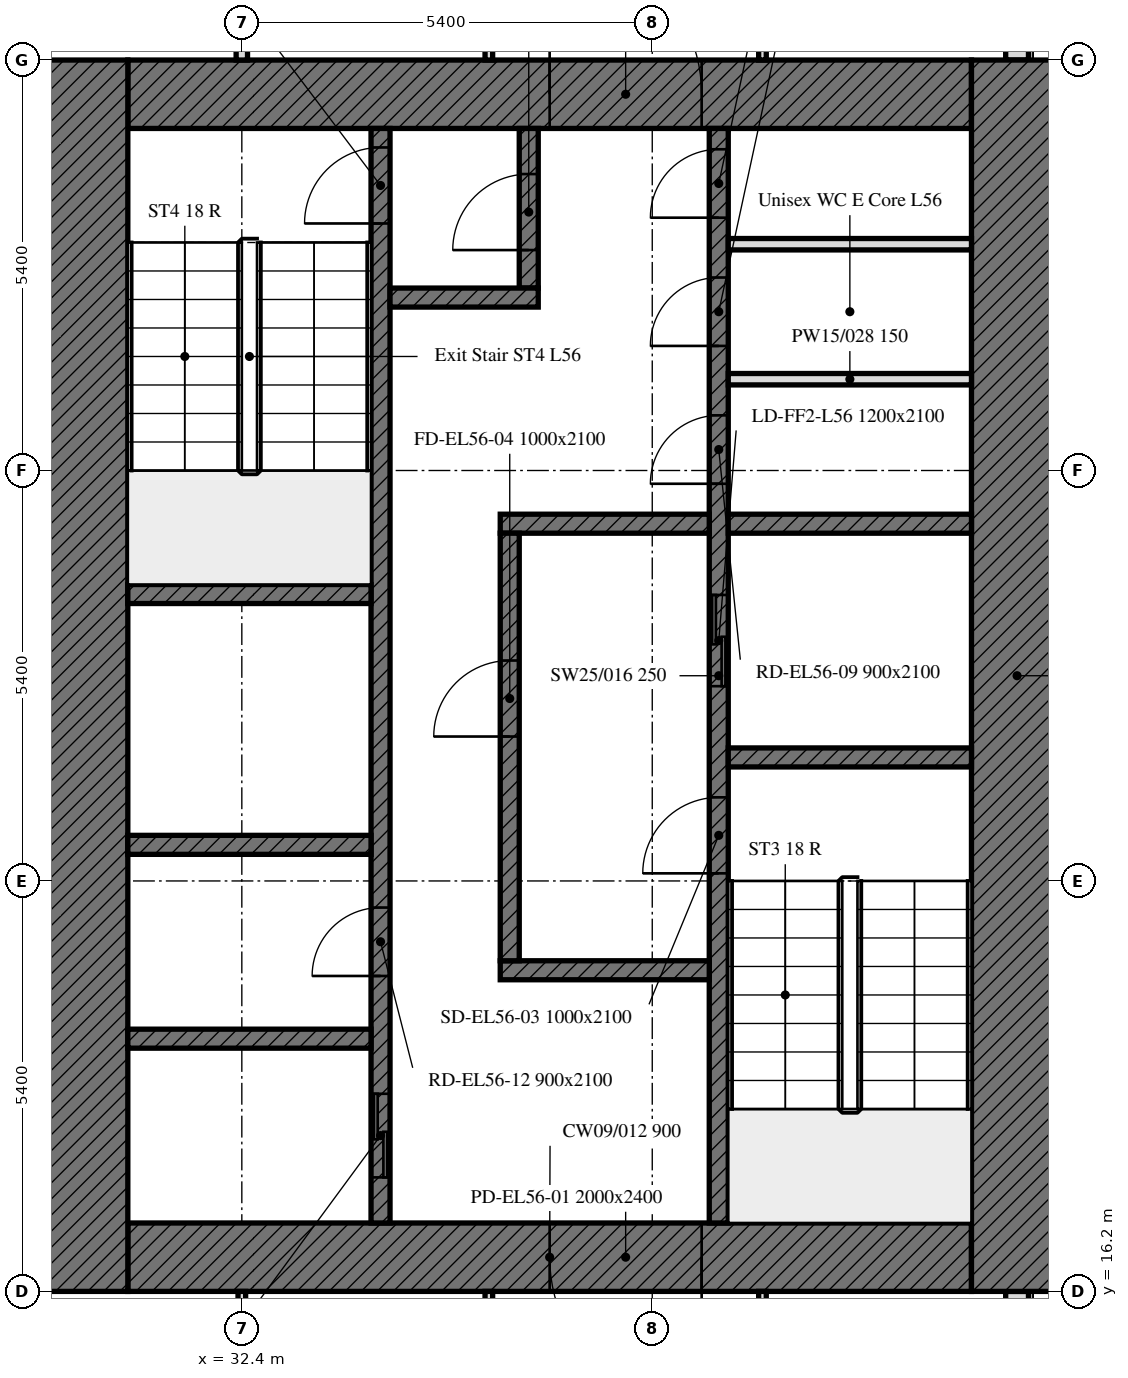
"""IFC4 building model, lengths in metres.
Left out: names, types, materials, properties, quantities, classifications, styles, units other than length and angle.
Written with IfcOpenShell. Run it as: python <this file> out.ifc"""

import sys

from ifc_helpers import new_model, si_unit, direction, frame, frame_2d, origin, place, context, subcontext, project, spatial, rectangle, extrude, element, fill, save


model = new_model("IFC4")
c1 = context("Model", 3, precision=1e-05, world=origin(), true_north=direction((0.0, 1.0)))
c2 = subcontext(c1, "Body", "Model", "MODEL_VIEW")
j1 = project(units=[si_unit("LENGTHUNIT", "METRE"), si_unit("PLANEANGLEUNIT", "RADIAN")], contexts=[c1])
p1 = place(None, origin())
s1 = spatial("IfcSite", under=j1, at=p1, CompositionType="ELEMENT")
p2 = place(p1, origin())
s2 = spatial("IfcBuilding", under=s1, at=p2, CompositionType="ELEMENT")
p3 = place(p2, frame((0.0, 0.0, 223.6)))
s3 = spatial("IfcBuildingStorey", under=s2, at=p3, CompositionType="ELEMENT", Elevation=223.6)
p4 = place(p3, frame((42.6, 10.986, 0.0), z_axis=(0.0, 0.0, 1.0), x_axis=(0.0, 1.0, 0.0)))
e1 = element("IfcWall", 1, at=p4, inside=s3, PredefinedType="SOLIDWALL", context=c2, shape_type="SweptSolid", body=[
    extrude(rectangle(XDim=5.214, YDim=0.3, at=frame_2d((2.607, 0.0))), origin(), (0.0, 0.0, 1.0), 3.0),
])
p5 = place(p4, frame((1.239, 0.0, 0.9)))
e2 = element("IfcOpeningElement", 2, at=p5, cuts=e1, PredefinedType="OPENING", context=c2, shape_type="SweptSolid", body=[
    extrude(rectangle(XDim=0.65, YDim=1.7, at=frame_2d((0.325, 0.85))), frame((0.0, 0.16, 0.0), z_axis=(0.0, -1.0, 0.0), x_axis=(1.0, 0.0, 0.0)), (0.0, 0.0, 1.0), 0.32),
])
p6 = place(p4, frame((2.764, 0.0, 0.9)))
e3 = element("IfcOpeningElement", 3, at=p6, cuts=e1, PredefinedType="OPENING", context=c2, shape_type="SweptSolid", body=[
    extrude(rectangle(XDim=1.1, YDim=1.7, at=frame_2d((0.55, 0.85))), frame((0.0, 0.16, 0.0), z_axis=(0.0, -1.0, 0.0), x_axis=(1.0, 0.0, 0.0)), (0.0, 0.0, 1.0), 0.32),
])
p7 = place(p3, frame((42.6, 32.4, 0.0), z_axis=(0.0, 0.0, 1.0), x_axis=(0.0, 1.0, 0.0)))
e4 = element("IfcWall", 4, at=p7, inside=s3, PredefinedType="SOLIDWALL", context=c2, shape_type="SweptSolid", body=[
    extrude(rectangle(XDim=10.614, YDim=0.3, at=frame_2d((5.307, 0.0))), origin(), (0.0, 0.0, 1.0), 3.0),
])
p8 = place(p7, frame((1.35, 0.0, 0.9)))
e5 = element("IfcOpeningElement", 5, at=p8, cuts=e4, PredefinedType="OPENING", context=c2, shape_type="SweptSolid", body=[
    extrude(rectangle(XDim=1.1, YDim=1.7, at=frame_2d((0.55, 0.85))), frame((0.0, 0.16, 0.0), z_axis=(0.0, -1.0, 0.0), x_axis=(1.0, 0.0, 0.0)), (0.0, 0.0, 1.0), 0.32),
])
p9 = place(p7, frame((2.95, 0.0, 0.9)))
e6 = element("IfcOpeningElement", 6, at=p9, cuts=e4, PredefinedType="OPENING", context=c2, shape_type="SweptSolid", body=[
    extrude(rectangle(XDim=1.1, YDim=1.7, at=frame_2d((0.55, 0.85))), frame((0.0, 0.16, 0.0), z_axis=(0.0, -1.0, 0.0), x_axis=(1.0, 0.0, 0.0)), (0.0, 0.0, 1.0), 0.32),
])
p10 = place(p7, frame((7.375, 0.0, 0.9)))
e7 = element("IfcOpeningElement", 7, at=p10, cuts=e4, PredefinedType="OPENING", context=c2, shape_type="SweptSolid", body=[
    extrude(rectangle(XDim=0.65, YDim=1.7, at=frame_2d((0.325, 0.85))), frame((0.0, 0.16, 0.0), z_axis=(0.0, -1.0, 0.0), x_axis=(1.0, 0.0, 0.0)), (0.0, 0.0, 1.0), 0.32),
])
p11 = place(p7, frame((8.175, 0.0, 0.9)))
e8 = element("IfcOpeningElement", 8, at=p11, cuts=e4, PredefinedType="OPENING", context=c2, shape_type="SweptSolid", body=[
    extrude(rectangle(XDim=0.65, YDim=1.7, at=frame_2d((0.325, 0.85))), frame((0.0, 0.16, 0.0), z_axis=(0.0, -1.0, 0.0), x_axis=(1.0, 0.0, 0.0)), (0.0, 0.0, 1.0), 0.32),
])
p12 = place(p3, frame((42.0, 16.65, 0.0), z_axis=(0.0, 0.0, 1.0), x_axis=(-1.0, 0.0, 0.0)))
e9 = element("IfcWall", 9, at=p12, inside=s3, PredefinedType="SOLIDWALL", context=c2, shape_type="SweptSolid", body=[
    extrude(rectangle(XDim=11.1, YDim=0.9, at=frame_2d((5.55, 0.0))), origin(), (0.0, 0.0, 1.0), 3.0),
])
p13 = place(p12, frame((3.55, 0.0, 0.0)))
e10 = element("IfcOpeningElement", 10, at=p13, cuts=e9, PredefinedType="OPENING", context=c2, shape_type="SweptSolid", body=[
    extrude(rectangle(XDim=2.0, YDim=2.4, at=frame_2d((1.0, 1.2))), frame((0.0, 0.45, 0.0), z_axis=(0.0, -1.0, 0.0), x_axis=(1.0, 0.0, 0.0)), (0.0, 0.0, 1.0), 0.9),
])
p14 = place(p3, frame((30.9, 31.95, 0.0), z_axis=(0.0, 0.0, 1.0), x_axis=(1.0, 0.0, 0.0)))
e11 = element("IfcWall", 11, at=p14, inside=s3, PredefinedType="SOLIDWALL", context=c2, shape_type="SweptSolid", body=[
    extrude(rectangle(XDim=11.1, YDim=0.9, at=frame_2d((5.55, 0.0))), origin(), (0.0, 0.0, 1.0), 3.0),
])
p15 = place(p14, frame((5.55, 0.0, 0.0)))
e12 = element("IfcOpeningElement", 12, at=p15, cuts=e11, PredefinedType="OPENING", context=c2, shape_type="SweptSolid", body=[
    extrude(rectangle(XDim=2.0, YDim=2.4, at=frame_2d((1.0, 1.2))), frame((0.0, 0.45, 0.0), z_axis=(0.0, -1.0, 0.0), x_axis=(1.0, 0.0, 0.0)), (0.0, 0.0, 1.0), 0.9),
])
for number, where, z_axis, x_axis in (
    (13, (42.6, 32.4, 0.0), (0.0, 0.0, 1.0), (0.0, -1.0, 0.0)),
    (14, (30.3, 16.2, 0.0), (0.0, 0.0, 1.0), (0.0, 1.0, 0.0)),
):
    element("IfcWall", number, at=place(p3, frame(where, z_axis=z_axis, x_axis=x_axis)), inside=s3, PredefinedType="SOLIDWALL", context=c2, shape_type="SweptSolid", body=[
        extrude(rectangle(XDim=16.2, YDim=1.2, at=frame_2d((8.1, 0.0))), origin(), (0.0, 0.0, 1.0), 3.0),
    ])
p16 = place(p3, frame((38.675, 17.1, 0.0), z_axis=(0.0, 0.0, 1.0), x_axis=(0.0, 1.0, 0.0)))
e15 = element("IfcWall", 15, at=p16, inside=s3, PredefinedType="SOLIDWALL", context=c2, shape_type="SweptSolid", body=[
    extrude(rectangle(XDim=14.4, YDim=0.25, at=frame_2d((7.2, 0.0))), origin(), (0.0, 0.0, 1.0), 3.0),
])
p17 = place(p16, frame((4.6, 0.0, 0.0)))
e16 = element("IfcOpeningElement", 16, at=p17, cuts=e15, PredefinedType="OPENING", context=c2, shape_type="SweptSolid", body=[
    extrude(rectangle(XDim=1.0, YDim=2.1, at=frame_2d((0.5, 1.05))), frame((0.0, 0.125, 0.0), z_axis=(0.0, -1.0, 0.0), x_axis=(1.0, 0.0, 0.0)), (0.0, 0.0, 1.0), 0.25),
])
p18 = place(p16, frame((7.062, 0.0, 0.0)))
e17 = element("IfcOpeningElement", 17, at=p18, cuts=e15, PredefinedType="OPENING", context=c2, shape_type="SweptSolid", body=[
    extrude(rectangle(XDim=1.2, YDim=2.1, at=frame_2d((0.6, 1.05))), frame((0.0, 0.125, 0.0), z_axis=(0.0, -1.0, 0.0), x_axis=(1.0, 0.0, 0.0)), (0.0, 0.0, 1.0), 0.25),
])
p19 = place(p16, frame((9.726, 0.0, 0.0)))
e18 = element("IfcOpeningElement", 18, at=p19, cuts=e15, PredefinedType="OPENING", context=c2, shape_type="SweptSolid", body=[
    extrude(rectangle(XDim=0.9, YDim=2.1, at=frame_2d((0.45, 1.05))), frame((0.0, 0.125, 0.0), z_axis=(0.0, -1.0, 0.0), x_axis=(1.0, 0.0, 0.0)), (0.0, 0.0, 1.0), 0.25),
])
p20 = place(p16, frame((11.539, 0.0, 0.0)))
e19 = element("IfcOpeningElement", 19, at=p20, cuts=e15, PredefinedType="OPENING", context=c2, shape_type="SweptSolid", body=[
    extrude(rectangle(XDim=0.9, YDim=2.1, at=frame_2d((0.45, 1.05))), frame((0.0, 0.125, 0.0), z_axis=(0.0, -1.0, 0.0), x_axis=(1.0, 0.0, 0.0)), (0.0, 0.0, 1.0), 0.25),
])
p21 = place(p16, frame((13.226, 0.0, 0.0)))
e20 = element("IfcOpeningElement", 20, at=p21, cuts=e15, PredefinedType="OPENING", context=c2, shape_type="SweptSolid", body=[
    extrude(rectangle(XDim=0.9, YDim=2.1, at=frame_2d((0.45, 1.05))), frame((0.0, 0.125, 0.0), z_axis=(0.0, -1.0, 0.0), x_axis=(1.0, 0.0, 0.0)), (0.0, 0.0, 1.0), 0.25),
])
p22 = place(p3, frame((34.225, 17.1, 0.0), z_axis=(0.0, 0.0, 1.0), x_axis=(0.0, 1.0, 0.0)))
e21 = element("IfcWall", 21, at=p22, inside=s3, PredefinedType="SOLIDWALL", context=c2, shape_type="SweptSolid", body=[
    extrude(rectangle(XDim=14.4, YDim=0.25, at=frame_2d((7.2, 0.0))), origin(), (0.0, 0.0, 1.0), 3.0),
])
p23 = place(p22, frame((13.15, 0.0, 0.0)))
e22 = element("IfcOpeningElement", 22, at=p23, cuts=e21, PredefinedType="OPENING", context=c2, shape_type="SweptSolid", body=[
    extrude(rectangle(XDim=1.0, YDim=2.1, at=frame_2d((0.5, 1.05))), frame((0.0, 0.125, 0.0), z_axis=(0.0, -1.0, 0.0), x_axis=(1.0, 0.0, 0.0)), (0.0, 0.0, 1.0), 0.25),
])
p24 = place(p22, frame((0.6, 0.0, 0.0)))
e23 = element("IfcOpeningElement", 23, at=p24, cuts=e21, PredefinedType="OPENING", context=c2, shape_type="SweptSolid", body=[
    extrude(rectangle(XDim=1.1, YDim=2.1, at=frame_2d((0.55, 1.05))), frame((0.0, 0.125, 0.0), z_axis=(0.0, -1.0, 0.0), x_axis=(1.0, 0.0, 0.0)), (0.0, 0.0, 1.0), 0.25),
])
p25 = place(p22, frame((3.25, 0.0, 0.0)))
e24 = element("IfcOpeningElement", 24, at=p25, cuts=e21, PredefinedType="OPENING", context=c2, shape_type="SweptSolid", body=[
    extrude(rectangle(XDim=0.9, YDim=2.1, at=frame_2d((0.45, 1.05))), frame((0.0, 0.125, 0.0), z_axis=(0.0, -1.0, 0.0), x_axis=(1.0, 0.0, 0.0)), (0.0, 0.0, 1.0), 0.25),
])
p26 = place(p3, frame((38.8, 23.225, 0.0), z_axis=(0.0, 0.0, 1.0), x_axis=(1.0, 0.0, 0.0)))
e25 = element("IfcWall", 25, at=p26, inside=s3, PredefinedType="SOLIDWALL", context=c2, shape_type="SweptSolid", body=[
    extrude(rectangle(XDim=3.2, YDim=0.25, at=frame_2d((1.6, 0.0))), origin(), (0.0, 0.0, 1.0), 3.0),
])
for number, where, z_axis, x_axis in (
    (26, (30.9, 25.375, 0.0), (0.0, 0.0, 1.0), (1.0, 0.0, 0.0)),
    (27, (30.9, 22.075, 0.0), (0.0, 0.0, 1.0), (1.0, 0.0, 0.0)),
):
    element("IfcWall", number, at=place(p3, frame(where, z_axis=z_axis, x_axis=x_axis)), inside=s3, PredefinedType="SOLIDWALL", context=c2, shape_type="SweptSolid", body=[
        extrude(rectangle(XDim=3.2, YDim=0.25, at=frame_2d((1.6, 0.0))), origin(), (0.0, 0.0, 1.0), 3.0),
    ])
p27 = place(p3, frame((38.8, 26.3, 0.0), z_axis=(0.0, 0.0, 1.0), x_axis=(1.0, 0.0, 0.0)))
e28 = element("IfcWall", 28, at=p27, inside=s3, PredefinedType="SOLIDWALL", context=c2, shape_type="SweptSolid", body=[
    extrude(rectangle(XDim=3.2, YDim=0.25, at=frame_2d((1.6, 0.0))), origin(), (0.0, 0.0, 1.0), 3.0),
])
for number, where, z_axis, x_axis in (
    (29, (35.8, 26.3, 0.0), (0.0, 0.0, 1.0), (1.0, 0.0, 0.0)),
    (30, (35.8, 20.425, 0.0), (0.0, 0.0, 1.0), (1.0, 0.0, 0.0)),
):
    element("IfcWall", number, at=place(p3, frame(where, z_axis=z_axis, x_axis=x_axis)), inside=s3, PredefinedType="SOLIDWALL", context=c2, shape_type="SweptSolid", body=[
        extrude(rectangle(XDim=2.75, YDim=0.25, at=frame_2d((1.375, 0.0))), origin(), (0.0, 0.0, 1.0), 3.0),
    ])
p28 = place(p3, frame((36.175, 29.4, 0.0), z_axis=(0.0, 0.0, 1.0), x_axis=(0.0, 1.0, 0.0)))
e31 = element("IfcWall", 31, at=p28, inside=s3, PredefinedType="SOLIDWALL", context=c2, shape_type="SweptSolid", body=[
    extrude(rectangle(XDim=2.1, YDim=0.25, at=frame_2d((1.05, 0.0))), origin(), (0.0, 0.0, 1.0), 3.0),
])
p29 = place(p28, frame((0.5, 0.0, 0.0)))
e32 = element("IfcOpeningElement", 32, at=p29, cuts=e31, PredefinedType="OPENING", context=c2, shape_type="SweptSolid", body=[
    extrude(rectangle(XDim=1.0, YDim=2.1, at=frame_2d((0.5, 1.05))), frame((0.0, 0.125, 0.0), z_axis=(0.0, -1.0, 0.0), x_axis=(1.0, 0.0, 0.0)), (0.0, 0.0, 1.0), 0.25),
])
p30 = place(p3, frame((34.35, 29.275, 0.0), z_axis=(0.0, 0.0, 1.0), x_axis=(1.0, 0.0, 0.0)))
e33 = element("IfcWall", 33, at=p30, inside=s3, PredefinedType="SOLIDWALL", context=c2, shape_type="SweptSolid", body=[
    extrude(rectangle(XDim=1.95, YDim=0.25, at=frame_2d((0.975, 0.0))), origin(), (0.0, 0.0, 1.0), 3.0),
])
p31 = place(p3, frame((35.925, 20.55, 0.0), z_axis=(0.0, 0.0, 1.0), x_axis=(0.0, 1.0, 0.0)))
e34 = element("IfcWall", 34, at=p31, inside=s3, PredefinedType="SOLIDWALL", context=c2, shape_type="SweptSolid", body=[
    extrude(rectangle(XDim=5.625, YDim=0.25, at=frame_2d((2.812, 0.0))), origin(), (0.0, 0.0, 1.0), 3.0),
])
p32 = place(p31, frame((2.95, 0.0, 0.0)))
e35 = element("IfcOpeningElement", 35, at=p32, cuts=e34, PredefinedType="OPENING", context=c2, shape_type="SweptSolid", body=[
    extrude(rectangle(XDim=1.0, YDim=2.1, at=frame_2d((0.5, 1.05))), frame((0.0, 0.125, 0.0), z_axis=(0.0, -1.0, 0.0), x_axis=(1.0, 0.0, 0.0)), (0.0, 0.0, 1.0), 0.25),
])
p33 = place(p3, frame((30.9, 19.525, 0.0), z_axis=(0.0, 0.0, 1.0), x_axis=(1.0, 0.0, 0.0)))
e36 = element("IfcWall", 36, at=p33, inside=s3, PredefinedType="SOLIDWALL", context=c2, shape_type="SweptSolid", body=[
    extrude(rectangle(XDim=3.2, YDim=0.25, at=frame_2d((1.6, 0.0))), origin(), (0.0, 0.0, 1.0), 3.0),
])
for number, where, z_axis, x_axis in (
    (37, (38.8, 28.201, 0.0), (0.0, 0.0, 1.0), (1.0, 0.0, 0.0)),
    (38, (38.8, 29.977, 0.0), (0.0, 0.0, 1.0), (1.0, 0.0, 0.0)),
):
    element("IfcWall", number, at=place(p3, frame(where, z_axis=z_axis, x_axis=x_axis)), inside=s3, PredefinedType="PARTITIONING", context=c2, shape_type="SweptSolid", body=[
        extrude(rectangle(XDim=3.2, YDim=0.15, at=frame_2d((1.6, 0.0))), origin(), (0.0, 0.0, 1.0), 3.0),
    ])
p34 = place(p3, frame((32.4, 32.4, 0.0), z_axis=(0.0, 0.0, 1.0), x_axis=(0.0, 1.0, 0.0)))
e39 = element("IfcWall", 39, at=p34, inside=s3, PredefinedType="PARTITIONING", context=c2, shape_type="SweptSolid", body=[
    extrude(rectangle(XDim=5.005, YDim=0.15, at=frame_2d((2.502, 0.0))), origin(), (0.0, 0.0, 1.0), 2.4),
])
for number, where, z_axis, x_axis in (
    (40, (39.25, 32.4, 0.0), (0.0, 0.0, 1.0), (0.0, 1.0, 0.0)),
    (41, (35.65, 39.525, 0.0), (0.0, 0.0, 1.0), (0.0, -1.0, 0.0)),
):
    element("IfcWall", number, at=place(p3, frame(where, z_axis=z_axis, x_axis=x_axis)), inside=s3, PredefinedType="PARTITIONING", context=c2, shape_type="SweptSolid", body=[
        extrude(rectangle(XDim=7.125, YDim=0.1, at=frame_2d((3.562, 0.0))), origin(), (0.0, 0.0, 1.0), 3.0),
    ])
for number, where, z_axis, x_axis in (
    (42, (32.4, 13.125, 0.0), (0.0, 0.0, 1.0), (0.0, 1.0, 0.0)),
    (43, (39.25, 13.125, 0.0), (0.0, 0.0, 1.0), (0.0, 1.0, 0.0)),
    (44, (35.65, 16.2, 0.0), (0.0, 0.0, 1.0), (0.0, -1.0, 0.0)),
):
    element("IfcWall", number, at=place(p3, frame(where, z_axis=z_axis, x_axis=x_axis)), inside=s3, PredefinedType="PARTITIONING", context=c2, shape_type="SweptSolid", body=[
        extrude(rectangle(XDim=3.075, YDim=0.1, at=frame_2d((1.538, 0.0))), origin(), (0.0, 0.0, 1.0), 3.0),
    ])
p35 = place(p13, origin())
e45 = element("IfcDoor", 45, at=p35, inside=s3, OperationType="DOUBLE_DOOR_SINGLE_SWING", PredefinedType="DOOR", context=c2, shape_type="SweptSolid", body=[
    extrude(rectangle(XDim=2.0, YDim=2.4, at=frame_2d((1.0, 1.2))), frame((0.0, 0.025, 0.0), z_axis=(0.0, -1.0, 0.0), x_axis=(1.0, 0.0, 0.0)), (0.0, 0.0, 1.0), 0.05),
])
fill(e10, e45)
p36 = place(p15, origin())
e46 = element("IfcDoor", 46, at=p36, inside=s3, OperationType="DOUBLE_DOOR_SINGLE_SWING", PredefinedType="DOOR", context=c2, shape_type="SweptSolid", body=[
    extrude(rectangle(XDim=2.0, YDim=2.4, at=frame_2d((1.0, 1.2))), frame((0.0, 0.025, 0.0), z_axis=(0.0, -1.0, 0.0), x_axis=(1.0, 0.0, 0.0)), (0.0, 0.0, 1.0), 0.05),
])
fill(e12, e46)
p37 = place(p17, origin())
e47 = element("IfcDoor", 47, at=p37, inside=s3, OperationType="SINGLE_SWING_LEFT", PredefinedType="DOOR", context=c2, shape_type="SweptSolid", body=[
    extrude(rectangle(XDim=1.0, YDim=2.1, at=frame_2d((0.5, 1.05))), frame((0.0, 0.025, 0.0), z_axis=(0.0, -1.0, 0.0), x_axis=(1.0, 0.0, 0.0)), (0.0, 0.0, 1.0), 0.05),
])
fill(e16, e47)
p38 = place(p32, origin())
e48 = element("IfcDoor", 48, at=p38, inside=s3, OperationType="SINGLE_SWING_LEFT", PredefinedType="DOOR", context=c2, shape_type="SweptSolid", body=[
    extrude(rectangle(XDim=1.0, YDim=2.1, at=frame_2d((0.5, 1.05))), frame((0.0, 0.025, 0.0), z_axis=(0.0, -1.0, 0.0), x_axis=(1.0, 0.0, 0.0)), (0.0, 0.0, 1.0), 0.05),
])
fill(e35, e48)
p39 = place(p23, origin())
e49 = element("IfcDoor", 49, at=p39, inside=s3, OperationType="SINGLE_SWING_LEFT", PredefinedType="DOOR", context=c2, shape_type="SweptSolid", body=[
    extrude(rectangle(XDim=1.0, YDim=2.1, at=frame_2d((0.5, 1.05))), frame((0.0, 0.025, 0.0), z_axis=(0.0, -1.0, 0.0), x_axis=(1.0, 0.0, 0.0)), (0.0, 0.0, 1.0), 0.05),
])
fill(e22, e49)
p40 = place(p29, origin())
e50 = element("IfcDoor", 50, at=p40, inside=s3, OperationType="SINGLE_SWING_LEFT", PredefinedType="DOOR", context=c2, shape_type="SweptSolid", body=[
    extrude(rectangle(XDim=1.0, YDim=2.1, at=frame_2d((0.5, 1.05))), frame((0.0, 0.025, 0.0), z_axis=(0.0, -1.0, 0.0), x_axis=(1.0, 0.0, 0.0)), (0.0, 0.0, 1.0), 0.05),
])
fill(e32, e50)
p41 = place(p18, origin())
e51 = element("IfcDoor", 51, at=p41, inside=s3, OperationType="DOUBLE_DOOR_SLIDING", PredefinedType="DOOR", context=c2, shape_type="SweptSolid", body=[
    extrude(rectangle(XDim=1.2, YDim=2.1, at=frame_2d((0.6, 1.05))), frame((0.0, 0.025, 0.0), z_axis=(0.0, -1.0, 0.0), x_axis=(1.0, 0.0, 0.0)), (0.0, 0.0, 1.0), 0.05),
])
fill(e17, e51)
p42 = place(p24, origin())
e52 = element("IfcDoor", 52, at=p42, inside=s3, OperationType="DOUBLE_DOOR_SLIDING", PredefinedType="DOOR", context=c2, shape_type="SweptSolid", body=[
    extrude(rectangle(XDim=1.1, YDim=2.1, at=frame_2d((0.55, 1.05))), frame((0.0, 0.025, 0.0), z_axis=(0.0, -1.0, 0.0), x_axis=(1.0, 0.0, 0.0)), (0.0, 0.0, 1.0), 0.05),
])
fill(e23, e52)
p43 = place(p19, origin())
e53 = element("IfcDoor", 53, at=p43, inside=s3, OperationType="SINGLE_SWING_LEFT", PredefinedType="DOOR", context=c2, shape_type="SweptSolid", body=[
    extrude(rectangle(XDim=0.9, YDim=2.1, at=frame_2d((0.45, 1.05))), frame((0.0, 0.025, 0.0), z_axis=(0.0, -1.0, 0.0), x_axis=(1.0, 0.0, 0.0)), (0.0, 0.0, 1.0), 0.05),
])
fill(e18, e53)
p44 = place(p20, origin())
e54 = element("IfcDoor", 54, at=p44, inside=s3, OperationType="SINGLE_SWING_LEFT", PredefinedType="DOOR", context=c2, shape_type="SweptSolid", body=[
    extrude(rectangle(XDim=0.9, YDim=2.1, at=frame_2d((0.45, 1.05))), frame((0.0, 0.025, 0.0), z_axis=(0.0, -1.0, 0.0), x_axis=(1.0, 0.0, 0.0)), (0.0, 0.0, 1.0), 0.05),
])
fill(e19, e54)
p45 = place(p21, origin())
e55 = element("IfcDoor", 55, at=p45, inside=s3, OperationType="SINGLE_SWING_LEFT", PredefinedType="DOOR", context=c2, shape_type="SweptSolid", body=[
    extrude(rectangle(XDim=0.9, YDim=2.1, at=frame_2d((0.45, 1.05))), frame((0.0, 0.025, 0.0), z_axis=(0.0, -1.0, 0.0), x_axis=(1.0, 0.0, 0.0)), (0.0, 0.0, 1.0), 0.05),
])
fill(e20, e55)
p46 = place(p25, origin())
e56 = element("IfcDoor", 56, at=p46, inside=s3, OperationType="SINGLE_SWING_LEFT", PredefinedType="DOOR", context=c2, shape_type="SweptSolid", body=[
    extrude(rectangle(XDim=0.9, YDim=2.1, at=frame_2d((0.45, 1.05))), frame((0.0, 0.025, 0.0), z_axis=(0.0, -1.0, 0.0), x_axis=(1.0, 0.0, 0.0)), (0.0, 0.0, 1.0), 0.05),
])
fill(e24, e56)
save(model, sys.argv[1])
